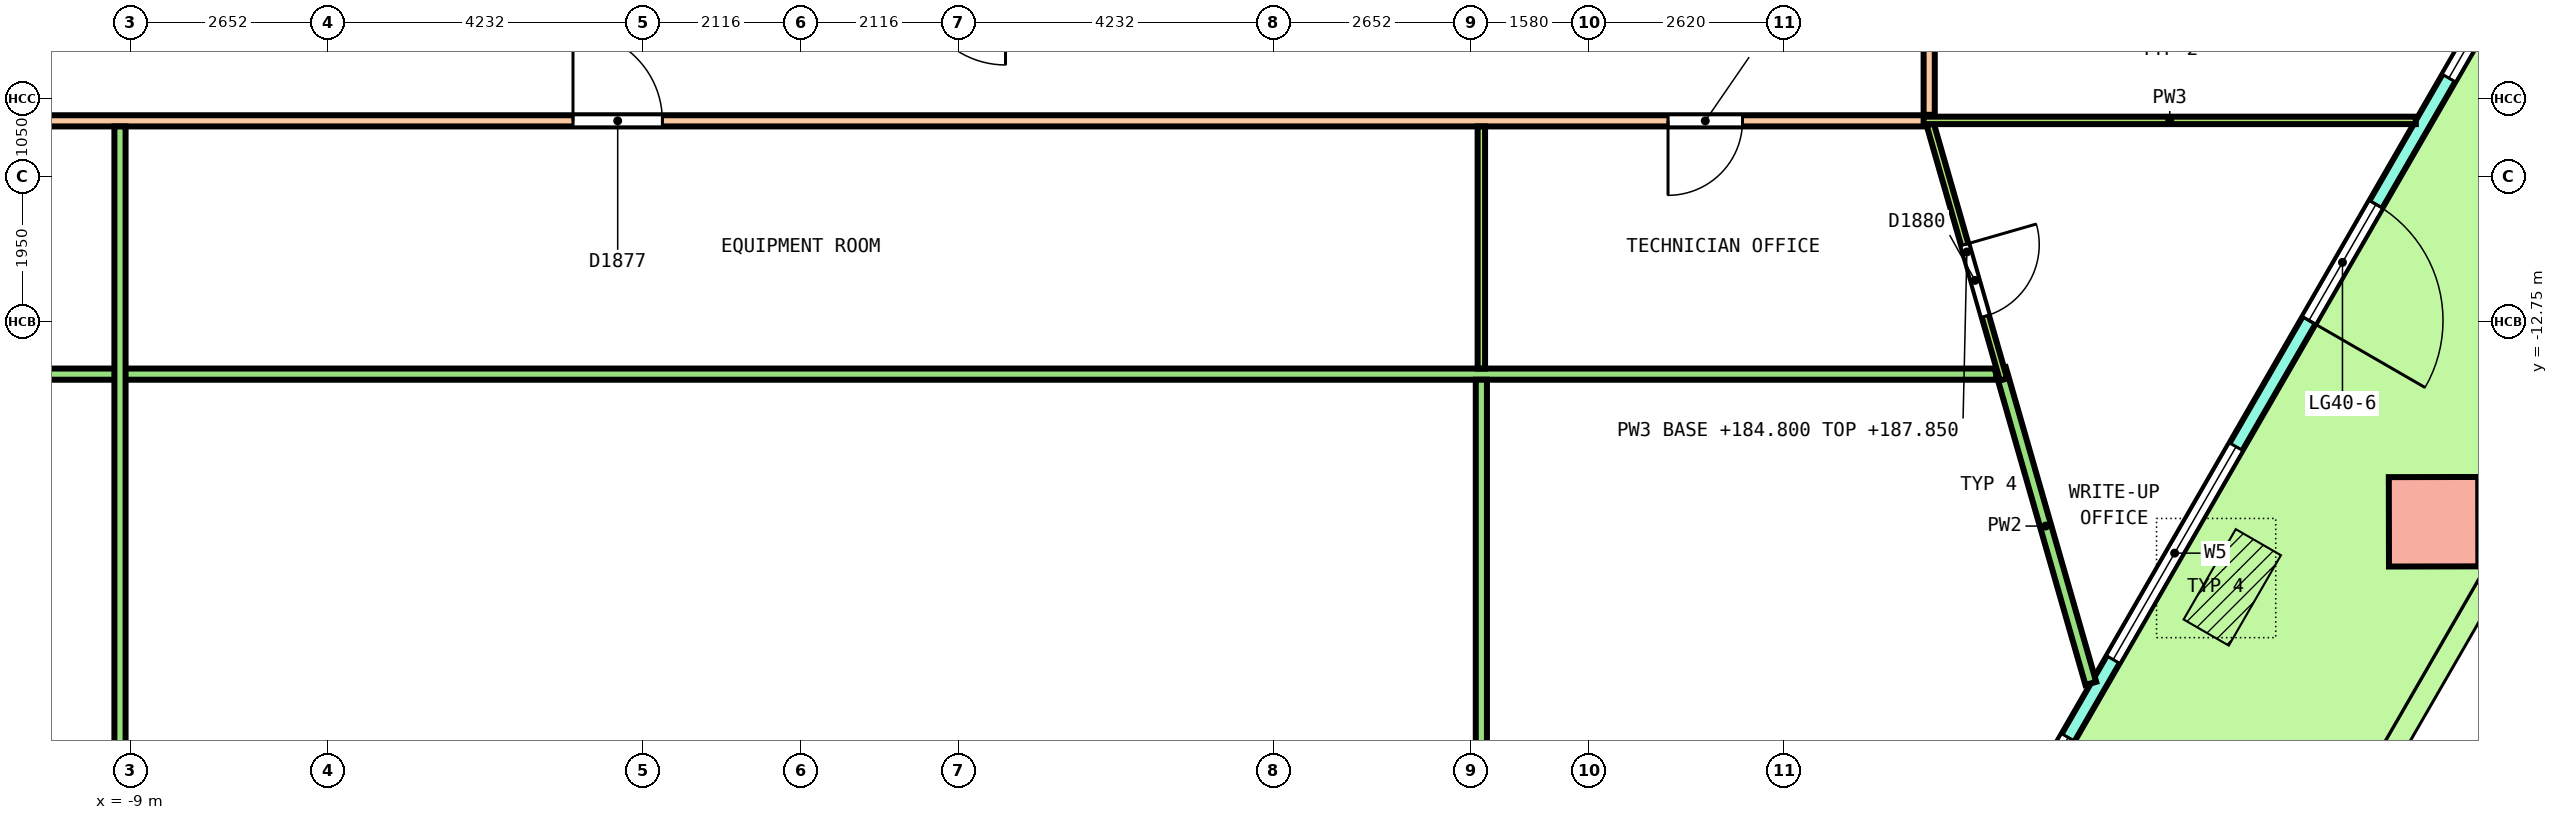
"""IFC4 building model, lengths in metres.
Left out: names, types, materials, properties, quantities, classifications, styles, units other than length and angle.
Written with IfcOpenShell. Run it as: python <this file> out.ifc"""

import sys

from ifc_helpers import new_model, si_unit, direction, frame, frame_2d, origin, origin_2d, place, context, subcontext, project, spatial, polyline, rectangle, outline, extrude, element, fill, save


model = new_model("IFC4")
c1 = context("Model", 3, precision=1e-05, world=origin(), true_north=direction((0.0, 1.0)))
c2 = subcontext(c1, "Body", "Model", "MODEL_VIEW")
j1 = project(units=[si_unit("LENGTHUNIT", "METRE"), si_unit("PLANEANGLEUNIT", "RADIAN")], contexts=[c1])
p1 = place(None, origin())
s1 = spatial("IfcSite", under=j1, at=p1, CompositionType="ELEMENT")
p2 = place(p1, origin())
s2 = spatial("IfcBuilding", under=s1, at=p2, CompositionType="ELEMENT")
p3 = place(p2, frame((0.0, 0.0, 184.8)))
s3 = spatial("IfcBuildingStorey", under=s2, at=p3, CompositionType="ELEMENT", Elevation=184.8)
p4 = place(p3, frame((21.921, -15.431, 0.0), z_axis=(-0.003616759812, -0.006269050341, 0.999973808685), x_axis=(0.498177152713, 0.867045063843, 0.007237525818)))
e1 = element("IfcColumn", 1, at=p4, inside=s3, PredefinedType="COLUMN", context=c2, shape_type="SweptSolid", body=[
    extrude(rectangle(XDim=1.2, YDim=1.2, at=origin_2d()), origin(), (0.0, 0.0, 1.0), 4.05),
])
p5 = place(p3, frame((15.065, -21.707, 0.0), z_axis=(0.0, 0.0, 1.0), x_axis=(0.499998501835, 0.866026268748, 0.0)))
e2 = element("IfcWall", 2, at=p5, inside=s3, PredefinedType="SOLIDWALL", context=c2, shape_type="SweptSolid", body=[
    extrude(outline(polyline([(-0.027, -0.1), (1.0, -0.1), (2.027, -0.1), (3.053, -0.1), (4.08, -0.1), (5.106, -0.1), (6.133, -0.1), (7.16, -0.1), (8.187, -0.1), (9.213, -0.1), (10.24, -0.1), (11.267, -0.1), (12.293, -0.1), (13.32, -0.1), (14.347, -0.1), (15.373, -0.1), (16.4, -0.1), (17.427, -0.1), (18.453, -0.1), (19.48, -0.1), (20.507, -0.1), (21.533, -0.1), (22.56, -0.1), (22.506, 0.1), (21.485, 0.1), (20.463, 0.1), (19.441, 0.1), (18.419, 0.1), (17.397, 0.1), (16.375, 0.1), (15.354, 0.1), (14.332, 0.1), (13.31, 0.1), (12.288, 0.1), (11.267, 0.1), (10.245, 0.1), (9.223, 0.1), (8.201, 0.1), (7.179, 0.1), (6.158, 0.1), (5.136, 0.1), (4.114, 0.1), (3.092, 0.1), (2.071, 0.1), (1.049, 0.1), (0.027, 0.1), (-0.027, -0.1)])), origin(), (0.0, 0.0, 1.0), 4.1),
])
p6 = place(p5, frame((0.603, 0.0, 0.1)))
e3 = element("IfcOpeningElement", 3, at=p6, cuts=e2, PredefinedType="OPENING", context=c2, shape_type="SweptSolid", body=[
    extrude(rectangle(XDim=3.3, YDim=2.9, at=frame_2d((1.65, 1.45))), frame((0.0, 0.11, 0.0), z_axis=(0.0, -1.0, 0.0), x_axis=(1.0, 0.0, 0.0)), (0.0, 0.0, 1.0), 0.22),
])
p7 = place(p5, frame((5.11, 0.0, 0.1)))
e4 = element("IfcOpeningElement", 4, at=p7, cuts=e2, PredefinedType="OPENING", context=c2, shape_type="SweptSolid", body=[
    extrude(rectangle(XDim=3.3, YDim=2.9, at=frame_2d((1.65, 1.45))), frame((0.0, 0.11, 0.0), z_axis=(0.0, -1.0, 0.0), x_axis=(1.0, 0.0, 0.0)), (0.0, 0.0, 1.0), 0.22),
])
p8 = place(p5, frame((10.367, 0.0, 0.0)))
e5 = element("IfcOpeningElement", 5, at=p8, cuts=e2, PredefinedType="OPENING", context=c2, shape_type="SweptSolid", body=[
    extrude(rectangle(XDim=1.8, YDim=2.4, at=frame_2d((0.9, 1.2))), frame((0.0, 0.11, 0.0), z_axis=(0.0, -1.0, 0.0), x_axis=(1.0, 0.0, 0.0)), (0.0, 0.0, 1.0), 0.22),
])
p9 = place(p5, frame((10.367, 0.0, 2.55)))
e6 = element("IfcOpeningElement", 6, at=p9, cuts=e2, PredefinedType="OPENING", context=c2, shape_type="SweptSolid", body=[
    extrude(rectangle(XDim=1.8, YDim=0.45, at=frame_2d((0.9, 0.225))), frame((0.0, 0.11, 0.0), z_axis=(0.0, -1.0, 0.0), x_axis=(1.0, 0.0, 0.0)), (0.0, 0.0, 1.0), 0.22),
])
p10 = place(p5, frame((14.123, 0.0, 0.1)))
e7 = element("IfcOpeningElement", 7, at=p10, cuts=e2, PredefinedType="OPENING", context=c2, shape_type="SweptSolid", body=[
    extrude(rectangle(XDim=3.3, YDim=2.9, at=frame_2d((1.65, 1.45))), frame((0.0, 0.11, 0.0), z_axis=(0.0, -1.0, 0.0), x_axis=(1.0, 0.0, 0.0)), (0.0, 0.0, 1.0), 0.22),
])
p11 = place(p5, frame((18.63, 0.0, 0.1)))
e8 = element("IfcOpeningElement", 8, at=p11, cuts=e2, PredefinedType="OPENING", context=c2, shape_type="SweptSolid", body=[
    extrude(rectangle(XDim=3.3, YDim=2.9, at=frame_2d((1.65, 1.45))), frame((0.0, 0.11, 0.0), z_axis=(0.0, -1.0, 0.0), x_axis=(1.0, 0.0, 0.0)), (0.0, 0.0, 1.0), 0.22),
])
p12 = place(p3, frame((15.15, -9.969, 0.0), z_axis=(0.0, 0.0, 1.0), x_axis=(0.0, 1.0, 0.0)))
e9 = element("IfcWall", 9, at=p12, inside=s3, PredefinedType="PARTITIONING", context=c2, shape_type="SweptSolid", body=[
    extrude(rectangle(XDim=8.556, YDim=0.15, at=frame_2d((4.278, 0.0))), origin(), (0.0, 0.0, 1.0), 3.05),
])
p13 = place(p12, frame((1.381, 0.0, 0.0)))
e10 = element("IfcOpeningElement", 10, at=p13, cuts=e9, PredefinedType="OPENING", context=c2, shape_type="SweptSolid", body=[
    extrude(rectangle(XDim=1.0, YDim=2.1, at=frame_2d((0.5, 1.05))), frame((0.0, 0.085, 0.0), z_axis=(0.0, -1.0, 0.0), x_axis=(1.0, 0.0, 0.0)), (0.0, 0.0, 1.0), 0.17),
])
p14 = place(p3, frame((-15.063, -10.05, 0.0), z_axis=(0.0, 0.0, 1.0), x_axis=(1.0, 0.0, 0.0)))
e11 = element("IfcWall", 11, at=p14, inside=s3, PredefinedType="PARTITIONING", context=c2, shape_type="SweptSolid", body=[
    extrude(rectangle(XDim=30.163, YDim=0.15, at=frame_2d((15.082, 0.0))), origin(), (0.0, 0.0, 1.0), 3.05),
])
p15 = place(p14, frame((3.5, 0.0, 0.0)))
e12 = element("IfcOpeningElement", 12, at=p15, cuts=e11, PredefinedType="OPENING", context=c2, shape_type="SweptSolid", body=[
    extrude(rectangle(XDim=1.0, YDim=2.1, at=frame_2d((0.5, 1.05))), frame((0.0, 0.085, 0.0), z_axis=(0.0, -1.0, 0.0), x_axis=(1.0, 0.0, 0.0)), (0.0, 0.0, 1.0), 0.17),
])
p16 = place(p14, frame((12.007, 0.0, 0.0)))
e13 = element("IfcOpeningElement", 13, at=p16, cuts=e11, PredefinedType="OPENING", context=c2, shape_type="SweptSolid", body=[
    extrude(rectangle(XDim=1.2, YDim=2.1, at=frame_2d((0.6, 1.05))), frame((0.0, 0.085, 0.0), z_axis=(0.0, -1.0, 0.0), x_axis=(1.0, 0.0, 0.0)), (0.0, 0.0, 1.0), 0.17),
])
p17 = place(p14, frame((26.707, 0.0, 0.0)))
e14 = element("IfcOpeningElement", 14, at=p17, cuts=e11, PredefinedType="OPENING", context=c2, shape_type="SweptSolid", body=[
    extrude(rectangle(XDim=1.0, YDim=2.1, at=frame_2d((0.5, 1.05))), frame((0.0, 0.085, 0.0), z_axis=(0.0, -1.0, 0.0), x_axis=(1.0, 0.0, 0.0)), (0.0, 0.0, 1.0), 0.17),
])
p18 = place(p3, frame((-15.063, -13.45, 0.0), z_axis=(0.0, 0.0, 1.0), x_axis=(1.0, 0.0, 0.0)))
e15 = element("IfcWall", 15, at=p18, inside=s3, PredefinedType="PARTITIONING", context=c2, shape_type="SweptSolid", body=[
    extrude(rectangle(XDim=31.115, YDim=0.15, at=frame_2d((15.558, 0.0))), origin(), (0.0, 0.0, 1.0), 3.05),
])
p19 = place(p18, frame((1.3, 0.0, 0.0)))
e16 = element("IfcOpeningElement", 16, at=p19, cuts=e15, PredefinedType="OPENING", context=c2, shape_type="SweptSolid", body=[
    extrude(rectangle(XDim=1.2, YDim=2.1, at=frame_2d((0.6, 1.05))), frame((0.0, 0.085, 0.0), z_axis=(0.0, -1.0, 0.0), x_axis=(1.0, 0.0, 0.0)), (0.0, 0.0, 1.0), 0.17),
])
p20 = place(p3, frame((-9.138, -25.013, 0.0), z_axis=(0.0, 0.0, 1.0), x_axis=(0.0, 1.0, 0.0)))
e17 = element("IfcWall", 17, at=p20, inside=s3, PredefinedType="PARTITIONING", context=c2, shape_type="SweptSolid", body=[
    extrude(rectangle(XDim=14.888, YDim=0.15, at=frame_2d((7.444, 0.0))), origin(), (0.0, 0.0, 1.0), 3.05),
])
p21 = place(p20, frame((3.732, 0.0, 0.0)))
e18 = element("IfcOpeningElement", 18, at=p21, cuts=e17, PredefinedType="OPENING", context=c2, shape_type="SweptSolid", body=[
    extrude(rectangle(XDim=1.2, YDim=2.1, at=frame_2d((0.6, 1.05))), frame((0.0, 0.085, 0.0), z_axis=(0.0, -1.0, 0.0), x_axis=(1.0, 0.0, 0.0)), (0.0, 0.0, 1.0), 0.17),
])
p22 = place(p3, frame((9.138, -25.013, 0.0), z_axis=(0.0, 0.0, 1.0), x_axis=(0.0, 1.0, 0.0)))
e19 = element("IfcWall", 19, at=p22, inside=s3, PredefinedType="PARTITIONING", context=c2, shape_type="SweptSolid", body=[
    extrude(rectangle(XDim=11.489, YDim=0.15, at=frame_2d((5.744, 0.0))), origin(), (0.0, 0.0, 1.0), 3.05),
])
p23 = place(p22, frame((3.732, 0.0, 0.0)))
e20 = element("IfcOpeningElement", 20, at=p23, cuts=e19, PredefinedType="OPENING", context=c2, shape_type="SweptSolid", body=[
    extrude(rectangle(XDim=1.2, YDim=2.1, at=frame_2d((0.6, 1.05))), frame((0.0, 0.085, 0.0), z_axis=(0.0, -1.0, 0.0), x_axis=(1.0, 0.0, 0.0)), (0.0, 0.0, 1.0), 0.17),
])
p24 = place(p3, frame((16.106, -13.378, 0.0), z_axis=(0.0, 0.0, 1.0), x_axis=(0.276181054881, -0.96110562631, 0.0)))
e21 = element("IfcWall", 21, at=p24, inside=s3, PredefinedType="PARTITIONING", context=c2, shape_type="SweptSolid", body=[
    extrude(rectangle(XDim=4.394, YDim=0.15, at=frame_2d((2.197, 0.0))), origin(), (0.0, 0.0, 1.0), 3.05),
])
p25 = place(p3, frame((9.138, -13.375, 0.0), z_axis=(0.0, 0.0, 1.0), x_axis=(0.0, 1.0, 0.0)))
e22 = element("IfcWall", 22, at=p25, inside=s3, PredefinedType="PARTITIONING", context=c2, shape_type="SweptSolid", body=[
    extrude(rectangle(XDim=3.25, YDim=0.1, at=frame_2d((1.625, 0.0))), origin(), (0.0, 0.0, 1.0), 3.05),
])
p26 = place(p3, frame((15.164, -10.098, 0.0), z_axis=(0.0, 0.0, 1.0), x_axis=(0.276168961066, -0.961109101478, 0.0)))
e23 = element("IfcWall", 23, at=p26, inside=s3, PredefinedType="PARTITIONING", context=c2, shape_type="SweptSolid", body=[
    extrude(rectangle(XDim=3.563, YDim=0.1, at=frame_2d((1.781, 0.0))), origin(), (0.0, 0.0, 1.0), 3.05),
])
p27 = place(p26, frame((1.678, 0.0, 0.0)))
e24 = element("IfcOpeningElement", 24, at=p27, cuts=e23, PredefinedType="OPENING", context=c2, shape_type="SweptSolid", body=[
    extrude(rectangle(XDim=1.0, YDim=2.1, at=frame_2d((0.5, 1.05))), frame((0.0, 0.06, 0.0), z_axis=(0.0, -1.0, 0.0), x_axis=(1.0, 0.0, 0.0)), (0.0, 0.0, 1.0), 0.12),
])
p28 = place(p3, frame((15.075, -10.044, 0.0), z_axis=(0.0, 0.0, 1.0), x_axis=(1.0, 0.0, 0.0)))
e25 = element("IfcWall", 25, at=p28, inside=s3, PredefinedType="PARTITIONING", context=c2, shape_type="SweptSolid", body=[
    extrude(rectangle(XDim=6.608, YDim=0.1, at=frame_2d((3.304, 0.0))), origin(), (0.0, 0.0, 1.0), 3.05),
])
p29 = place(p6, origin())
e26 = element("IfcWindow", 26, at=p29, inside=s3, PartitioningType="SINGLE_PANEL", PredefinedType="WINDOW", context=c2, shape_type="SweptSolid", body=[
    extrude(rectangle(XDim=3.3, YDim=2.9, at=frame_2d((1.65, 1.45))), frame((0.0, 0.03, 0.0), z_axis=(0.0, -1.0, 0.0), x_axis=(1.0, 0.0, 0.0)), (0.0, 0.0, 1.0), 0.06),
])
fill(e3, e26)
p30 = place(p7, origin())
e27 = element("IfcWindow", 27, at=p30, inside=s3, PartitioningType="SINGLE_PANEL", PredefinedType="WINDOW", context=c2, shape_type="SweptSolid", body=[
    extrude(rectangle(XDim=3.3, YDim=2.9, at=frame_2d((1.65, 1.45))), frame((0.0, 0.03, 0.0), z_axis=(0.0, -1.0, 0.0), x_axis=(1.0, 0.0, 0.0)), (0.0, 0.0, 1.0), 0.06),
])
fill(e4, e27)
p31 = place(p8, origin())
e28 = element("IfcDoor", 28, at=p31, inside=s3, OperationType="DOUBLE_DOOR_SINGLE_SWING", PredefinedType="DOOR", context=c2, shape_type="SweptSolid", body=[
    extrude(rectangle(XDim=1.8, YDim=2.4, at=frame_2d((0.9, 1.2))), frame((0.0, 0.025, 0.0), z_axis=(0.0, -1.0, 0.0), x_axis=(1.0, 0.0, 0.0)), (0.0, 0.0, 1.0), 0.05),
])
fill(e5, e28)
p32 = place(p9, origin())
e29 = element("IfcWindow", 29, at=p32, inside=s3, PartitioningType="SINGLE_PANEL", PredefinedType="WINDOW", context=c2, shape_type="SweptSolid", body=[
    extrude(rectangle(XDim=1.8, YDim=0.45, at=frame_2d((0.9, 0.225))), frame((0.0, 0.03, 0.0), z_axis=(0.0, -1.0, 0.0), x_axis=(1.0, 0.0, 0.0)), (0.0, 0.0, 1.0), 0.06),
])
fill(e6, e29)
p33 = place(p10, origin())
e30 = element("IfcWindow", 30, at=p33, inside=s3, PartitioningType="SINGLE_PANEL", PredefinedType="WINDOW", context=c2, shape_type="SweptSolid", body=[
    extrude(rectangle(XDim=3.3, YDim=2.9, at=frame_2d((1.65, 1.45))), frame((0.0, 0.03, 0.0), z_axis=(0.0, -1.0, 0.0), x_axis=(1.0, 0.0, 0.0)), (0.0, 0.0, 1.0), 0.06),
])
fill(e7, e30)
p34 = place(p16, origin())
e31 = element("IfcDoor", 31, at=p34, inside=s3, OperationType="DOUBLE_DOOR_SINGLE_SWING", PredefinedType="DOOR", context=c2, shape_type="SweptSolid", body=[
    extrude(rectangle(XDim=1.2, YDim=2.1, at=frame_2d((0.6, 1.05))), frame((0.0, 0.025, 0.0), z_axis=(0.0, -1.0, 0.0), x_axis=(1.0, 0.0, 0.0)), (0.0, 0.0, 1.0), 0.05),
])
fill(e13, e31)
p35 = place(p17, origin())
e32 = element("IfcDoor", 32, at=p35, inside=s3, OperationType="SINGLE_SWING_LEFT", PredefinedType="DOOR", context=c2, shape_type="SweptSolid", body=[
    extrude(rectangle(XDim=1.0, YDim=2.1, at=frame_2d((0.5, 1.05))), frame((0.0, 0.025, 0.0), z_axis=(0.0, -1.0, 0.0), x_axis=(1.0, 0.0, 0.0)), (0.0, 0.0, 1.0), 0.05),
])
fill(e14, e32)
p36 = place(p27, origin())
e33 = element("IfcDoor", 33, at=p36, inside=s3, OperationType="SINGLE_SWING_RIGHT", PredefinedType="DOOR", context=c2, shape_type="SweptSolid", body=[
    extrude(rectangle(XDim=1.0, YDim=2.1, at=frame_2d((0.5, 1.05))), frame((0.0, 0.025, 0.0), z_axis=(0.0, -1.0, 0.0), x_axis=(1.0, 0.0, 0.0)), (0.0, 0.0, 1.0), 0.05),
])
fill(e24, e33)
save(model, sys.argv[1])
